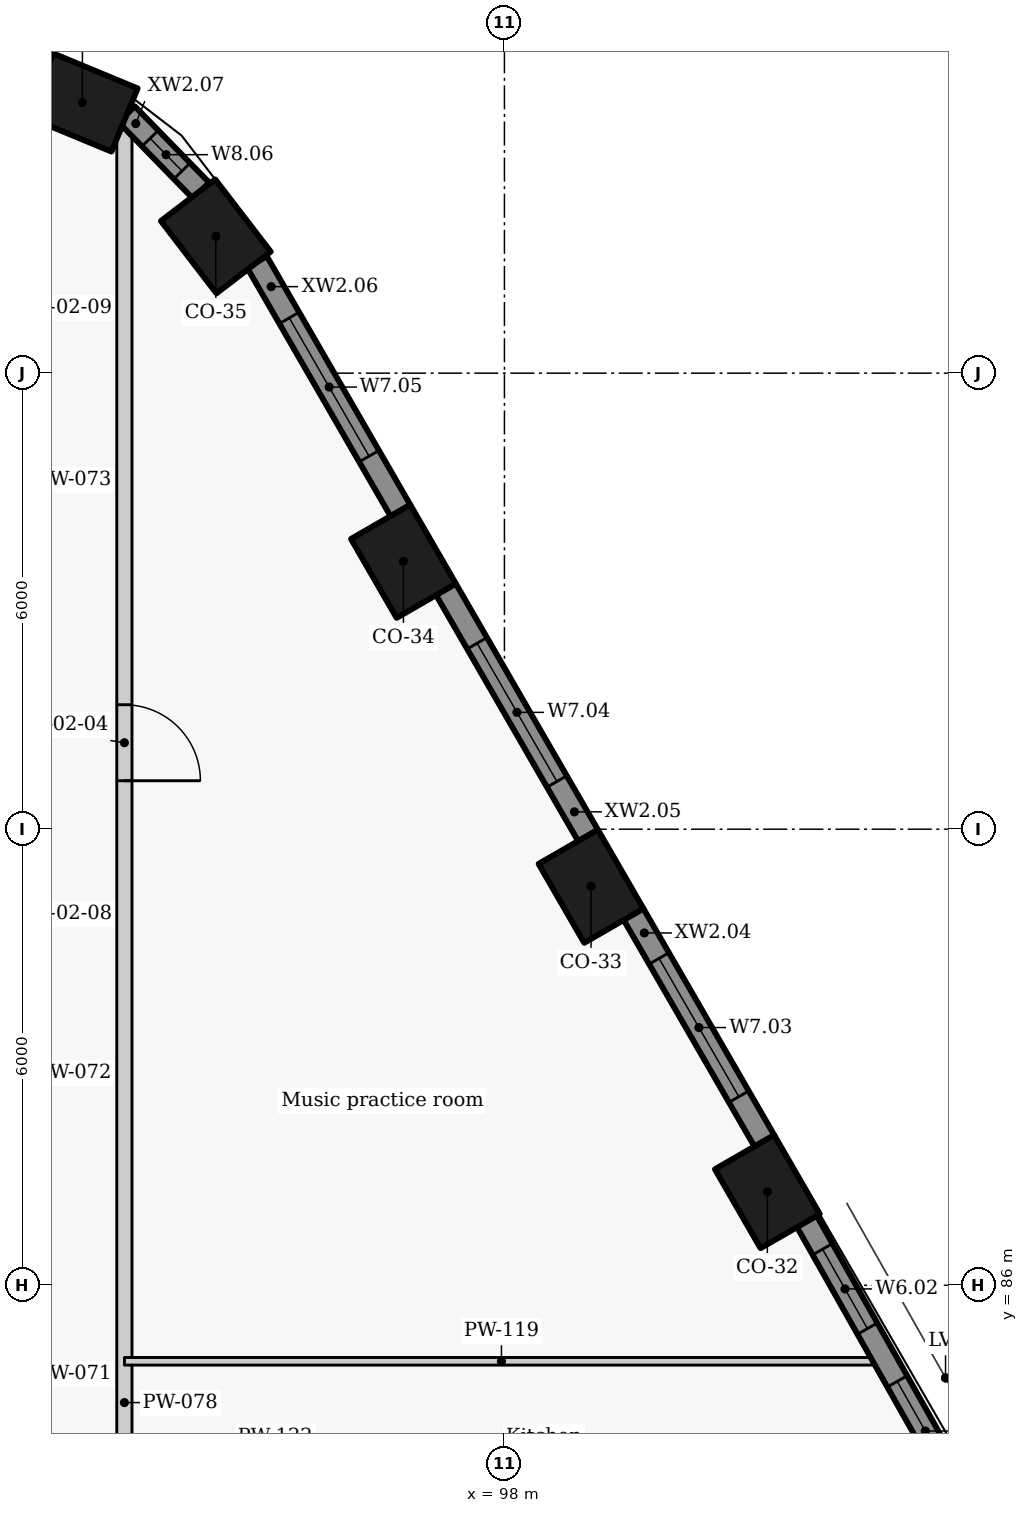
"""IFC4 building model, lengths in metres.
Left out: names, types, materials, properties, quantities, classifications, styles, units other than length and angle.
Written with IfcOpenShell. Run it as: python <this file> out.ifc"""

import sys

from ifc_helpers import new_model, si_unit, direction, frame, frame_2d, origin, origin_2d, place, context, subcontext, project, spatial, rectangle, extrude, element, fill, save


model = new_model("IFC4")
c1 = context("Model", 3, precision=1e-05, world=origin(), true_north=direction((0.0, 1.0)))
c2 = subcontext(c1, "Body", "Model", "MODEL_VIEW")
j1 = project(units=[si_unit("LENGTHUNIT", "METRE"), si_unit("PLANEANGLEUNIT", "RADIAN")], contexts=[c1])
p1 = place(None, origin())
s1 = spatial("IfcSite", under=j1, at=p1, CompositionType="ELEMENT")
p2 = place(p1, origin())
s2 = spatial("IfcBuilding", under=s1, at=p2, CompositionType="ELEMENT")
p3 = place(p2, frame((0.0, 0.0, 183.3)))
s3 = spatial("IfcBuildingStorey", under=s2, at=p3, CompositionType="ELEMENT", Elevation=183.3)
for number, where, z_axis, x_axis in (
    (1, (101.459, 87.232, 0.0), (0.0, 0.0, 1.0), (-0.5, 0.866, 0.0)),
    (2, (99.139, 91.25, 0.0), (0.0, 0.0, 1.0), (-0.5, 0.866, 0.0)),
    (3, (96.671, 95.525, 0.0), (0.0, 0.0, 1.0), (-0.5, 0.866, 0.0)),
    (4, (94.203, 99.8, 0.0), (0.0, 0.0, 1.0), (-0.609, 0.793, 0.0)),
    (5, (92.448, 101.56, 0.0), (0.0, 0.0, 1.0), (-0.924, 0.383, 0.0)),
):
    element("IfcColumn", number, at=place(p3, frame(where, z_axis=z_axis, x_axis=x_axis)), inside=s3, PredefinedType="COLUMN", context=c2, shape_type="SweptSolid", body=[
        extrude(rectangle(XDim=1.2, YDim=0.9, at=origin_2d()), origin(), (0.0, 0.0, 1.0), 3.3),
    ])
p4 = place(p3, frame((104.627, 82.154, 0.0), z_axis=(0.0, 0.0, 1.0), x_axis=(-0.492033360928, 0.870576344575, 0.0)))
e6 = element("IfcWall", 6, at=p4, inside=s3, PredefinedType="SOLIDWALL", context=c2, shape_type="SweptSolid", body=[
    extrude(rectangle(XDim=5.387, YDim=0.3, at=frame_2d((2.693, 0.0))), origin(), (0.0, 0.0, 1.0), 2.425),
])
p5 = place(p4, frame((1.466, 0.0, 0.9)))
e7 = element("IfcOpeningElement", 7, at=p5, cuts=e6, PredefinedType="OPENING", context=c2, shape_type="SweptSolid", body=[
    extrude(rectangle(XDim=1.5, YDim=1.1, at=frame_2d((0.75, 0.55))), frame((0.0, 0.16, 0.0), z_axis=(0.0, -1.0, 0.0), x_axis=(1.0, 0.0, 0.0)), (0.0, 0.0, 1.0), 0.32),
])
p6 = place(p4, frame((3.763, 0.0, 0.9)))
e8 = element("IfcOpeningElement", 8, at=p6, cuts=e6, PredefinedType="OPENING", context=c2, shape_type="SweptSolid", body=[
    extrude(rectangle(XDim=1.2, YDim=1.1, at=frame_2d((0.6, 0.55))), frame((0.0, 0.16, 0.0), z_axis=(0.0, -1.0, 0.0), x_axis=(1.0, 0.0, 0.0)), (0.0, 0.0, 1.0), 0.32),
])
p7 = place(p3, frame((101.421, 87.898, 0.0), z_axis=(0.0, 0.0, 1.0), x_axis=(-0.499955427682, 0.866051136095, 0.0)))
e9 = element("IfcWall", 9, at=p7, inside=s3, PredefinedType="SOLIDWALL", context=c2, shape_type="SweptSolid", body=[
    extrude(rectangle(XDim=3.447, YDim=0.3, at=frame_2d((1.724, 0.0))), origin(), (0.0, 0.0, 1.0), 2.425),
])
p8 = place(p7, frame((0.674, 0.0, 0.9)))
e10 = element("IfcOpeningElement", 10, at=p8, cuts=e9, PredefinedType="OPENING", context=c2, shape_type="SweptSolid", body=[
    extrude(rectangle(XDim=2.1, YDim=1.1, at=frame_2d((1.05, 0.55))), frame((0.0, 0.16, 0.0), z_axis=(0.0, -1.0, 0.0), x_axis=(1.0, 0.0, 0.0)), (0.0, 0.0, 1.0), 0.32),
])
p9 = place(p3, frame((99.101, 91.916, 0.0), z_axis=(0.0, 0.0, 1.0), x_axis=(-0.500059225181, 0.86599120741, 0.0)))
e11 = element("IfcWall", 11, at=p9, inside=s3, PredefinedType="SOLIDWALL", context=c2, shape_type="SweptSolid", body=[
    extrude(rectangle(XDim=3.744, YDim=0.3, at=frame_2d((1.872, 0.0))), origin(), (0.0, 0.0, 1.0), 2.425),
])
p10 = place(p9, frame((0.822, 0.0, 0.9)))
e12 = element("IfcOpeningElement", 12, at=p10, cuts=e11, PredefinedType="OPENING", context=c2, shape_type="SweptSolid", body=[
    extrude(rectangle(XDim=2.1, YDim=1.1, at=frame_2d((1.05, 0.55))), frame((0.0, 0.16, 0.0), z_axis=(0.0, -1.0, 0.0), x_axis=(1.0, 0.0, 0.0)), (0.0, 0.0, 1.0), 0.32),
])
p11 = place(p3, frame((96.633, 96.191, 0.0), z_axis=(0.0, 0.0, 1.0), x_axis=(-0.499961087031, 0.866047869032, 0.0)))
e13 = element("IfcWall", 13, at=p11, inside=s3, PredefinedType="SOLIDWALL", context=c2, shape_type="SweptSolid", body=[
    extrude(rectangle(XDim=3.779, YDim=0.3, at=frame_2d((1.889, 0.0))), origin(), (0.0, 0.0, 1.0), 2.425),
])
p12 = place(p11, frame((0.828, 0.0, 0.9)))
e14 = element("IfcOpeningElement", 14, at=p12, cuts=e13, PredefinedType="OPENING", context=c2, shape_type="SweptSolid", body=[
    extrude(rectangle(XDim=2.1, YDim=1.1, at=frame_2d((1.05, 0.55))), frame((0.0, 0.16, 0.0), z_axis=(0.0, -1.0, 0.0), x_axis=(1.0, 0.0, 0.0)), (0.0, 0.0, 1.0), 0.32),
])
p13 = place(p3, frame((94.009, 100.402, 0.0), z_axis=(0.0, 0.0, 1.0), x_axis=(-0.69817596362, 0.715926199984, 0.0)))
e15 = element("IfcWall", 15, at=p13, inside=s3, PredefinedType="SOLIDWALL", context=c2, shape_type="SweptSolid", body=[
    extrude(rectangle(XDim=1.403, YDim=0.3, at=frame_2d((0.701, 0.0))), origin(), (0.0, 0.0, 1.0), 2.425),
])
p14 = place(p13, frame((0.36, 0.0, 0.9)))
e16 = element("IfcOpeningElement", 16, at=p14, cuts=e15, PredefinedType="OPENING", context=c2, shape_type="SweptSolid", body=[
    extrude(rectangle(XDim=0.6, YDim=1.1, at=frame_2d((0.3, 0.55))), frame((0.0, 0.16, 0.0), z_axis=(0.0, -1.0, 0.0), x_axis=(1.0, 0.0, 0.0)), (0.0, 0.0, 1.0), 0.32),
])
p15 = place(p3, frame((93.0, 101.281, 0.0), z_axis=(0.0, 0.0, 1.0), x_axis=(0.0, -1.0, 0.0)))
e17 = element("IfcWall", 17, at=p15, inside=s3, PredefinedType="PARTITIONING", context=c2, shape_type="SweptSolid", body=[
    extrude(rectangle(XDim=42.606, YDim=0.2, at=frame_2d((21.303, 0.0))), origin(), (0.0, 0.0, 1.0), 2.405),
])
p16 = place(p15, frame((39.33, 0.0, 0.0)))
e18 = element("IfcOpeningElement", 18, at=p16, cuts=e17, PredefinedType="OPENING", context=c2, shape_type="SweptSolid", body=[
    extrude(rectangle(XDim=1.0, YDim=2.1, at=frame_2d((0.5, 1.05))), frame((0.0, 0.11, 0.0), z_axis=(0.0, -1.0, 0.0), x_axis=(1.0, 0.0, 0.0)), (0.0, 0.0, 1.0), 0.22),
])
p17 = place(p15, frame((25.005, 0.0, 0.0)))
e19 = element("IfcOpeningElement", 19, at=p17, cuts=e17, PredefinedType="OPENING", context=c2, shape_type="SweptSolid", body=[
    extrude(rectangle(XDim=1.0, YDim=2.1, at=frame_2d((0.5, 1.05))), frame((0.0, 0.11, 0.0), z_axis=(0.0, -1.0, 0.0), x_axis=(1.0, 0.0, 0.0)), (0.0, 0.0, 1.0), 0.22),
])
p18 = place(p15, frame((7.643, 0.0, 0.0)))
e20 = element("IfcOpeningElement", 20, at=p18, cuts=e17, PredefinedType="OPENING", context=c2, shape_type="SweptSolid", body=[
    extrude(rectangle(XDim=1.0, YDim=2.1, at=frame_2d((0.5, 1.05))), frame((0.0, 0.11, 0.0), z_axis=(0.0, -1.0, 0.0), x_axis=(1.0, 0.0, 0.0)), (0.0, 0.0, 1.0), 0.22),
])
p19 = place(p3, frame((93.001, 85.0, 0.0), z_axis=(0.0, 0.0, 1.0), x_axis=(1.0, 0.0, 0.0)))
e21 = element("IfcWall", 21, at=p19, inside=s3, PredefinedType="PARTITIONING", context=c2, shape_type="SweptSolid", body=[
    extrude(rectangle(XDim=9.92, YDim=0.1, at=frame_2d((4.96, 0.0))), origin(), (0.0, 0.0, 1.0), 2.405),
])
p20 = place(p5, origin())
e22 = element("IfcWindow", 22, at=p20, inside=s3, PartitioningType="SINGLE_PANEL", PredefinedType="WINDOW", context=c2, shape_type="SweptSolid", body=[
    extrude(rectangle(XDim=1.5, YDim=1.1, at=frame_2d((0.75, 0.55))), frame((0.0, 0.03, 0.0), z_axis=(0.0, -1.0, 0.0), x_axis=(1.0, 0.0, 0.0)), (0.0, 0.0, 1.0), 0.06),
])
fill(e7, e22)
p21 = place(p6, origin())
e23 = element("IfcWindow", 23, at=p21, inside=s3, PartitioningType="SINGLE_PANEL", PredefinedType="WINDOW", context=c2, shape_type="SweptSolid", body=[
    extrude(rectangle(XDim=1.2, YDim=1.1, at=frame_2d((0.6, 0.55))), frame((0.0, 0.03, 0.0), z_axis=(0.0, -1.0, 0.0), x_axis=(1.0, 0.0, 0.0)), (0.0, 0.0, 1.0), 0.06),
])
fill(e8, e23)
p22 = place(p8, origin())
e24 = element("IfcWindow", 24, at=p22, inside=s3, PartitioningType="SINGLE_PANEL", PredefinedType="WINDOW", context=c2, shape_type="SweptSolid", body=[
    extrude(rectangle(XDim=2.1, YDim=1.1, at=frame_2d((1.05, 0.55))), frame((0.0, 0.03, 0.0), z_axis=(0.0, -1.0, 0.0), x_axis=(1.0, 0.0, 0.0)), (0.0, 0.0, 1.0), 0.06),
])
fill(e10, e24)
p23 = place(p10, origin())
e25 = element("IfcWindow", 25, at=p23, inside=s3, PartitioningType="SINGLE_PANEL", PredefinedType="WINDOW", context=c2, shape_type="SweptSolid", body=[
    extrude(rectangle(XDim=2.1, YDim=1.1, at=frame_2d((1.05, 0.55))), frame((0.0, 0.03, 0.0), z_axis=(0.0, -1.0, 0.0), x_axis=(1.0, 0.0, 0.0)), (0.0, 0.0, 1.0), 0.06),
])
fill(e12, e25)
p24 = place(p12, origin())
e26 = element("IfcWindow", 26, at=p24, inside=s3, PartitioningType="SINGLE_PANEL", PredefinedType="WINDOW", context=c2, shape_type="SweptSolid", body=[
    extrude(rectangle(XDim=2.1, YDim=1.1, at=frame_2d((1.05, 0.55))), frame((0.0, 0.03, 0.0), z_axis=(0.0, -1.0, 0.0), x_axis=(1.0, 0.0, 0.0)), (0.0, 0.0, 1.0), 0.06),
])
fill(e14, e26)
p25 = place(p14, origin())
e27 = element("IfcWindow", 27, at=p25, inside=s3, PartitioningType="SINGLE_PANEL", PredefinedType="WINDOW", context=c2, shape_type="SweptSolid", body=[
    extrude(rectangle(XDim=0.6, YDim=1.1, at=frame_2d((0.3, 0.55))), frame((0.0, 0.03, 0.0), z_axis=(0.0, -1.0, 0.0), x_axis=(1.0, 0.0, 0.0)), (0.0, 0.0, 1.0), 0.06),
])
fill(e16, e27)
p26 = place(p18, origin())
e28 = element("IfcDoor", 28, at=p26, inside=s3, OperationType="SINGLE_SWING_RIGHT", PredefinedType="DOOR", context=c2, shape_type="SweptSolid", body=[
    extrude(rectangle(XDim=1.0, YDim=2.1, at=frame_2d((0.5, 1.05))), frame((0.0, 0.025, 0.0), z_axis=(0.0, -1.0, 0.0), x_axis=(1.0, 0.0, 0.0)), (0.0, 0.0, 1.0), 0.05),
])
fill(e20, e28)
save(model, sys.argv[1])
